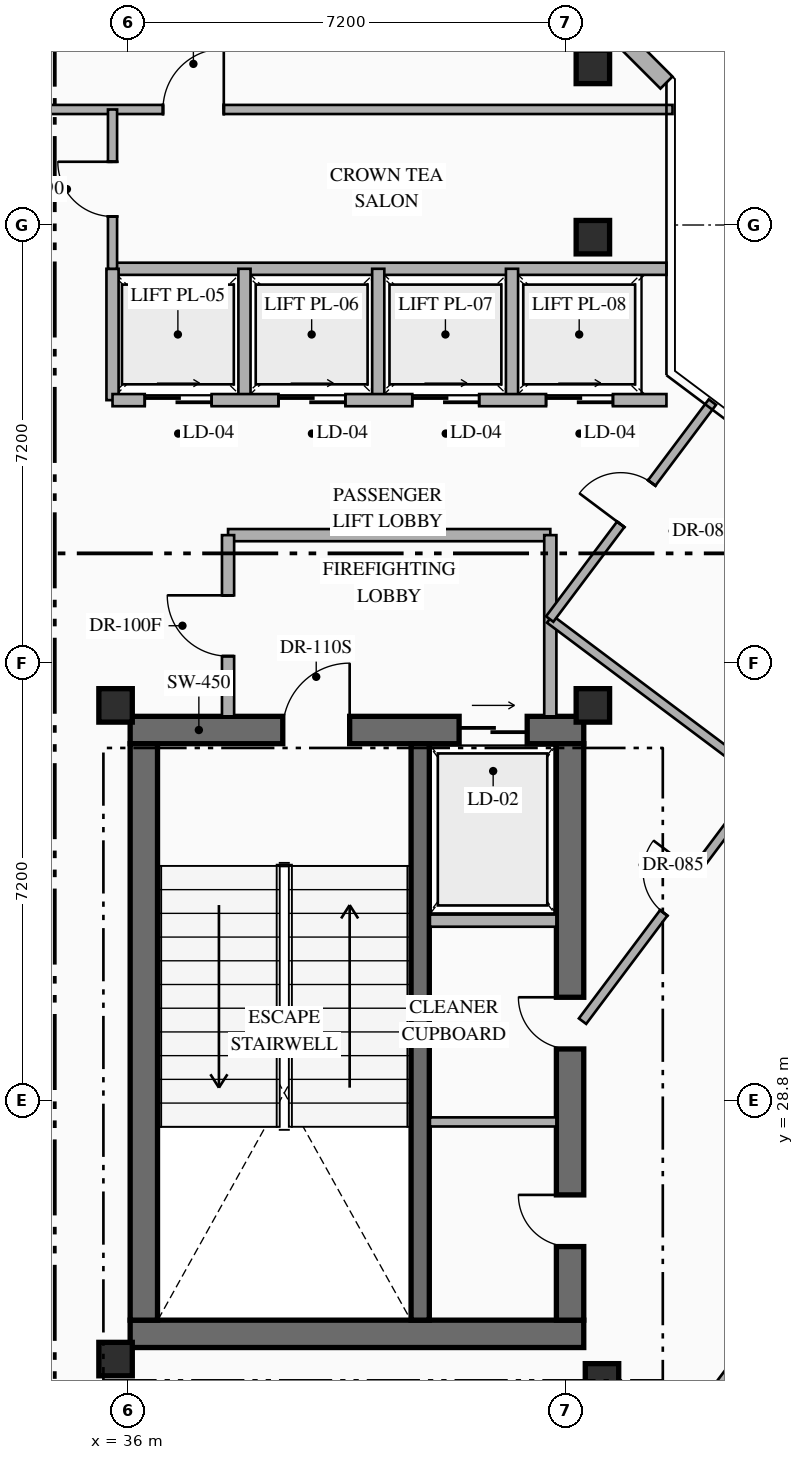
"""IFC4 building model, lengths in metres.
Left out: names, types, materials, properties, quantities, classifications, styles, units other than length and angle.
Written with IfcOpenShell. Run it as: python <this file> out.ifc"""

import sys

from ifc_helpers import new_model, si_unit, direction, frame, frame_2d, origin, origin_2d, place, context, subcontext, project, spatial, rectangle, hollow_rectangle, extrude, element, fill, save


model = new_model("IFC4")
c1 = context("Model", 3, precision=1e-05, world=origin(), true_north=direction((0.0, 1.0)))
c2 = subcontext(c1, "Body", "Model", "MODEL_VIEW")
j1 = project(units=[si_unit("LENGTHUNIT", "METRE"), si_unit("PLANEANGLEUNIT", "RADIAN")], contexts=[c1])
p1 = place(None, origin())
s1 = spatial("IfcSite", under=j1, at=p1, CompositionType="ELEMENT")
p2 = place(p1, origin())
s2 = spatial("IfcBuilding", under=s1, at=p2, CompositionType="ELEMENT")
p3 = place(p2, frame((0.0, 0.0, 281.95)))
s3 = spatial("IfcBuildingStorey", under=s2, at=p3, CompositionType="ELEMENT", Elevation=281.95)
p4 = place(p3, frame((36.04, 24.965, 0.0), z_axis=(0.0, 0.0, 1.0), x_axis=(1.0, 0.0, 0.0)))
e1 = element("IfcWall", 1, at=p4, inside=s3, PredefinedType="SHEAR", context=c2, shape_type="SweptSolid", body=[
    extrude(rectangle(XDim=7.46, YDim=0.45, at=frame_2d((3.73, 0.0))), origin(), (0.0, 0.0, 1.0), 4.0),
])
p5 = place(p3, frame((36.04, 34.895, 0.0), z_axis=(0.0, 0.0, 1.0), x_axis=(1.0, 0.0, 0.0)))
e2 = element("IfcWall", 2, at=p5, inside=s3, PredefinedType="SHEAR", context=c2, shape_type="SweptSolid", body=[
    extrude(rectangle(XDim=7.46, YDim=0.45, at=frame_2d((3.73, 0.0))), origin(), (0.0, 0.0, 1.0), 4.0),
])
p6 = place(p5, frame((2.51, 0.0, 0.0)))
e3 = element("IfcOpeningElement", 3, at=p6, cuts=e2, PredefinedType="OPENING", context=c2, shape_type="SweptSolid", body=[
    extrude(rectangle(XDim=1.1, YDim=2.2, at=frame_2d((0.55, 1.1))), frame((0.0, 0.235, 0.0), z_axis=(0.0, -1.0, 0.0), x_axis=(1.0, 0.0, 0.0)), (0.0, 0.0, 1.0), 0.47),
])
p7 = place(p5, frame((5.41, 0.0, 0.0)))
e4 = element("IfcOpeningElement", 4, at=p7, cuts=e2, PredefinedType="OPENING", context=c2, shape_type="SweptSolid", body=[
    extrude(rectangle(XDim=1.12, YDim=2.15, at=frame_2d((0.56, 1.075))), frame((0.0, 0.235, 0.0), z_axis=(0.0, -1.0, 0.0), x_axis=(1.0, 0.0, 0.0)), (0.0, 0.0, 1.0), 0.47),
])
p8 = place(p3, frame((36.265, 25.19, 0.0), z_axis=(0.0, 0.0, 1.0), x_axis=(0.0, 1.0, 0.0)))
e5 = element("IfcWall", 5, at=p8, inside=s3, PredefinedType="SHEAR", context=c2, shape_type="SweptSolid", body=[
    extrude(rectangle(XDim=9.48, YDim=0.45, at=frame_2d((4.74, 0.0))), origin(), (0.0, 0.0, 1.0), 4.0),
])
p9 = place(p3, frame((43.275, 25.19, 0.0), z_axis=(0.0, 0.0, 1.0), x_axis=(0.0, 1.0, 0.0)))
e6 = element("IfcWall", 6, at=p9, inside=s3, PredefinedType="SHEAR", context=c2, shape_type="SweptSolid", body=[
    extrude(rectangle(XDim=9.48, YDim=0.45, at=frame_2d((4.74, 0.0))), origin(), (0.0, 0.0, 1.0), 4.0),
])
p10 = place(p9, frame((1.21, 0.0, 0.0)))
e7 = element("IfcOpeningElement", 7, at=p10, cuts=e6, PredefinedType="OPENING", context=c2, shape_type="SweptSolid", body=[
    extrude(rectangle(XDim=0.85, YDim=2.08, at=frame_2d((0.425, 1.04))), frame((0.0, 0.235, 0.0), z_axis=(0.0, -1.0, 0.0), x_axis=(1.0, 0.0, 0.0)), (0.0, 0.0, 1.0), 0.47),
])
p11 = place(p9, frame((4.46, 0.0, 0.0)))
e8 = element("IfcOpeningElement", 8, at=p11, cuts=e6, PredefinedType="OPENING", context=c2, shape_type="SweptSolid", body=[
    extrude(rectangle(XDim=0.85, YDim=2.08, at=frame_2d((0.425, 1.04))), frame((0.0, 0.235, 0.0), z_axis=(0.0, -1.0, 0.0), x_axis=(1.0, 0.0, 0.0)), (0.0, 0.0, 1.0), 0.47),
])
p12 = place(p3, frame((40.81, 25.19, 0.0), z_axis=(0.0, 0.0, 1.0), x_axis=(0.0, 1.0, 0.0)))
e9 = element("IfcWall", 9, at=p12, inside=s3, PredefinedType="SHEAR", context=c2, shape_type="SweptSolid", body=[
    extrude(rectangle(XDim=9.48, YDim=0.3, at=frame_2d((4.74, 0.0))), origin(), (0.0, 0.0, 1.0), 4.0),
])
for number, where, z_axis, x_axis in (
    (10, (35.8, 24.55, 0.0), (0.0, 0.0, 1.0), (1.0, 0.0, 0.0)),
    (11, (43.8, 24.2, 0.0), (0.0, 0.0, 1.0), (1.0, 0.0, 0.0)),
    (12, (35.8, 35.3, 0.0), (0.0, 0.0, 1.0), (1.0, 0.0, 0.0)),
    (13, (43.65, 35.3, 0.0), (0.0, 0.0, 1.0), (1.0, 0.0, 0.0)),
    (14, (43.65, 43.0, 0.0), (0.0, 0.0, 1.0), (1.0, 0.0, 0.0)),
    (15, (43.65, 45.8, 0.0), (0.0, 0.0, 1.0), (1.0, 0.0, 0.0)),
):
    element("IfcColumn", number, at=place(p3, frame(where, z_axis=z_axis, x_axis=x_axis)), inside=s3, PredefinedType="COLUMN", context=c2, shape_type="SweptSolid", body=[
        extrude(hollow_rectangle(XDim=0.55, YDim=0.55, WallThickness=0.022, at=origin_2d()), origin(), (0.0, 0.0, 1.0), 4.0),
    ])
p13 = place(p3, frame((52.053, 32.438, 0.0), z_axis=(0.0, 0.0, 1.0), x_axis=(-0.599970072971, -0.800022444397, 0.0)))
e16 = element("IfcWall", 16, at=p13, inside=s3, PredefinedType="STANDARD", context=c2, shape_type="SweptSolid", body=[
    extrude(rectangle(XDim=20.885, YDim=0.28, at=frame_2d((10.442, 0.0))), origin(), (0.0, 0.0, 1.0), 3.75),
])
p14 = place(p13, frame((14.734, 0.0, 0.0)))
e17 = element("IfcOpeningElement", 17, at=p14, cuts=e16, PredefinedType="OPENING", context=c2, shape_type="SweptSolid", body=[
    extrude(rectangle(XDim=1.1, YDim=2.2, at=frame_2d((0.55, 1.1))), frame((0.0, 0.15, 0.0), z_axis=(0.0, -1.0, 0.0), x_axis=(1.0, 0.0, 0.0)), (0.0, 0.0, 1.0), 0.3),
])
p15 = place(p13, frame((6.842, 0.0, 0.0)))
e18 = element("IfcOpeningElement", 18, at=p15, cuts=e16, PredefinedType="OPENING", context=c2, shape_type="SweptSolid", body=[
    extrude(rectangle(XDim=1.1, YDim=2.2, at=frame_2d((0.55, 1.1))), frame((0.0, 0.15, 0.0), z_axis=(0.0, -1.0, 0.0), x_axis=(1.0, 0.0, 0.0)), (0.0, 0.0, 1.0), 0.3),
])
p16 = place(p13, frame((3.962, 0.0, 0.75)))
e19 = element("IfcOpeningElement", 19, at=p16, cuts=e16, PredefinedType="OPENING", context=c2, shape_type="SweptSolid", body=[
    extrude(rectangle(XDim=2.2, YDim=2.2, at=frame_2d((1.1, 1.1))), frame((0.0, 0.15, 0.0), z_axis=(0.0, -1.0, 0.0), x_axis=(1.0, 0.0, 0.0)), (0.0, 0.0, 1.0), 0.3),
])
p17 = place(p3, frame((42.542, 47.86, 0.0), z_axis=(0.0, 0.0, 1.0), x_axis=(0.707106781187, -0.707106781187, 0.0)))
e20 = element("IfcWall", 20, at=p17, inside=s3, PredefinedType="STANDARD", context=c2, shape_type="SweptSolid", body=[
    extrude(rectangle(XDim=3.278, YDim=0.28, at=frame_2d((1.639, 0.0))), origin(), (0.0, 0.0, 1.0), 3.75),
])
p18 = place(p3, frame((40.97, 31.76, 0.0), z_axis=(0.0, 0.0, 1.0), x_axis=(1.0, 0.0, 0.0)))
e21 = element("IfcWall", 21, at=p18, inside=s3, PredefinedType="STANDARD", context=c2, shape_type="SweptSolid", body=[
    extrude(rectangle(XDim=2.08, YDim=0.2, at=frame_2d((1.04, 0.0))), origin(), (0.0, 0.0, 1.0), 3.75),
])
p19 = place(p3, frame((40.97, 28.45, 0.0), z_axis=(0.0, 0.0, 1.0), x_axis=(1.0, 0.0, 0.0)))
e22 = element("IfcWall", 22, at=p19, inside=s3, PredefinedType="PARTITIONING", context=c2, shape_type="SweptSolid", body=[
    extrude(rectangle(XDim=2.08, YDim=0.15, at=frame_2d((1.04, 0.0))), origin(), (0.0, 0.0, 1.0), 3.75),
])
p20 = place(p3, frame((37.65, 38.1, 0.0), z_axis=(0.0, 0.0, 1.0), x_axis=(1.0, 0.0, 0.0)))
e23 = element("IfcWall", 23, at=p20, inside=s3, PredefinedType="STANDARD", context=c2, shape_type="SweptSolid", body=[
    extrude(rectangle(XDim=5.3, YDim=0.2, at=frame_2d((2.65, 0.0))), origin(), (0.0, 0.0, 1.0), 3.75),
])
p21 = place(p3, frame((42.95, 35.12, 0.0), z_axis=(0.0, 0.0, 1.0), x_axis=(0.0, 1.0, 0.0)))
e24 = element("IfcWall", 24, at=p21, inside=s3, PredefinedType="STANDARD", context=c2, shape_type="SweptSolid", body=[
    extrude(rectangle(XDim=2.98, YDim=0.2, at=frame_2d((1.49, 0.0))), origin(), (0.0, 0.0, 1.0), 3.75),
])
p22 = place(p3, frame((37.65, 35.12, 0.0), z_axis=(0.0, 0.0, 1.0), x_axis=(0.0, 1.0, 0.0)))
e25 = element("IfcWall", 25, at=p22, inside=s3, PredefinedType="STANDARD", context=c2, shape_type="SweptSolid", body=[
    extrude(rectangle(XDim=2.98, YDim=0.2, at=frame_2d((1.49, 0.0))), origin(), (0.0, 0.0, 1.0), 3.75),
])
p23 = place(p22, frame((0.99, 0.0, 0.0)))
e26 = element("IfcOpeningElement", 26, at=p23, cuts=e25, PredefinedType="OPENING", context=c2, shape_type="SweptSolid", body=[
    extrude(rectangle(XDim=1.0, YDim=2.2, at=frame_2d((0.5, 1.1))), frame((0.0, 0.11, 0.0), z_axis=(0.0, -1.0, 0.0), x_axis=(1.0, 0.0, 0.0)), (0.0, 0.0, 1.0), 0.22),
])
p24 = place(p3, frame((35.75, 42.48, 0.0), z_axis=(0.0, 0.0, 1.0), x_axis=(1.0, 0.0, 0.0)))
e27 = element("IfcWall", 27, at=p24, inside=s3, PredefinedType="STANDARD", context=c2, shape_type="SweptSolid", body=[
    extrude(rectangle(XDim=9.11, YDim=0.2, at=frame_2d((4.555, 0.0))), origin(), (0.0, 0.0, 1.0), 3.75),
])
for number, where, z_axis, x_axis in (
    (28, (35.75, 40.32, 0.0), (0.0, 0.0, 1.0), (0.0, 1.0, 0.0)),
    (29, (37.92, 40.32, 0.0), (0.0, 0.0, 1.0), (0.0, 1.0, 0.0)),
    (30, (40.12, 40.32, 0.0), (0.0, 0.0, 1.0), (0.0, 1.0, 0.0)),
    (31, (42.32, 40.32, 0.0), (0.0, 0.0, 1.0), (0.0, 1.0, 0.0)),
):
    element("IfcWall", number, at=place(p3, frame(where, z_axis=z_axis, x_axis=x_axis)), inside=s3, PredefinedType="STANDARD", context=c2, shape_type="SweptSolid", body=[
        extrude(rectangle(XDim=2.16, YDim=0.2, at=frame_2d((1.08, 0.0))), origin(), (0.0, 0.0, 1.0), 3.75),
    ])
p25 = place(p3, frame((35.75, 40.32, 0.0), z_axis=(0.0, 0.0, 1.0), x_axis=(1.0, 0.0, 0.0)))
e32 = element("IfcWall", 32, at=p25, inside=s3, PredefinedType="STANDARD", context=c2, shape_type="SweptSolid", body=[
    extrude(rectangle(XDim=9.11, YDim=0.2, at=frame_2d((4.555, 0.0))), origin(), (0.0, 0.0, 1.0), 3.75),
])
p26 = place(p25, frame((0.53, 0.0, 0.0)))
e33 = element("IfcOpeningElement", 33, at=p26, cuts=e32, PredefinedType="OPENING", context=c2, shape_type="SweptSolid", body=[
    extrude(rectangle(XDim=1.1, YDim=2.18, at=frame_2d((0.55, 1.09))), frame((0.0, 0.11, 0.0), z_axis=(0.0, -1.0, 0.0), x_axis=(1.0, 0.0, 0.0)), (0.0, 0.0, 1.0), 0.22),
])
p27 = place(p25, frame((2.73, 0.0, 0.0)))
e34 = element("IfcOpeningElement", 34, at=p27, cuts=e32, PredefinedType="OPENING", context=c2, shape_type="SweptSolid", body=[
    extrude(rectangle(XDim=1.1, YDim=2.18, at=frame_2d((0.55, 1.09))), frame((0.0, 0.11, 0.0), z_axis=(0.0, -1.0, 0.0), x_axis=(1.0, 0.0, 0.0)), (0.0, 0.0, 1.0), 0.22),
])
p28 = place(p25, frame((4.93, 0.0, 0.0)))
e35 = element("IfcOpeningElement", 35, at=p28, cuts=e32, PredefinedType="OPENING", context=c2, shape_type="SweptSolid", body=[
    extrude(rectangle(XDim=1.1, YDim=2.18, at=frame_2d((0.55, 1.09))), frame((0.0, 0.11, 0.0), z_axis=(0.0, -1.0, 0.0), x_axis=(1.0, 0.0, 0.0)), (0.0, 0.0, 1.0), 0.22),
])
p29 = place(p25, frame((7.13, 0.0, 0.0)))
e36 = element("IfcOpeningElement", 36, at=p29, cuts=e32, PredefinedType="OPENING", context=c2, shape_type="SweptSolid", body=[
    extrude(rectangle(XDim=1.1, YDim=2.18, at=frame_2d((0.55, 1.09))), frame((0.0, 0.11, 0.0), z_axis=(0.0, -1.0, 0.0), x_axis=(1.0, 0.0, 0.0)), (0.0, 0.0, 1.0), 0.22),
])
p30 = place(p3, frame((23.2, 45.1, 0.0), z_axis=(0.0, 0.0, 1.0), x_axis=(1.0, 0.0, 0.0)))
e37 = element("IfcWall", 37, at=p30, inside=s3, PredefinedType="PARTITIONING", context=c2, shape_type="SweptSolid", body=[
    extrude(rectangle(XDim=21.76, YDim=0.15, at=frame_2d((10.88, 0.0))), origin(), (0.0, 0.0, 1.0), 3.75),
])
p31 = place(p30, frame((13.38, 0.0, 0.0)))
e38 = element("IfcOpeningElement", 38, at=p31, cuts=e37, PredefinedType="OPENING", context=c2, shape_type="SweptSolid", body=[
    extrude(rectangle(XDim=1.0, YDim=2.15, at=frame_2d((0.5, 1.075))), frame((0.0, 0.085, 0.0), z_axis=(0.0, -1.0, 0.0), x_axis=(1.0, 0.0, 0.0)), (0.0, 0.0, 1.0), 0.17),
])
p32 = place(p3, frame((35.75, 42.48, 0.0), z_axis=(0.0, 0.0, 1.0), x_axis=(0.0, 1.0, 0.0)))
e39 = element("IfcWall", 39, at=p32, inside=s3, PredefinedType="PARTITIONING", context=c2, shape_type="SweptSolid", body=[
    extrude(rectangle(XDim=2.62, YDim=0.15, at=frame_2d((1.31, 0.0))), origin(), (0.0, 0.0, 1.0), 3.75),
])
p33 = place(p32, frame((0.86, 0.0, 0.0)))
e40 = element("IfcOpeningElement", 40, at=p33, cuts=e39, PredefinedType="OPENING", context=c2, shape_type="SweptSolid", body=[
    extrude(rectangle(XDim=0.9, YDim=2.15, at=frame_2d((0.45, 1.075))), frame((0.0, 0.085, 0.0), z_axis=(0.0, -1.0, 0.0), x_axis=(1.0, 0.0, 0.0)), (0.0, 0.0, 1.0), 0.17),
])
p34 = place(p3, frame((28.18, 27.04, 0.0), z_axis=(0.0, 0.0, 1.0), x_axis=(0.80000367127, -0.599995104942, 0.0)))
e41 = element("IfcWall", 41, at=p34, inside=s3, PredefinedType="PARTITIONING", context=c2, shape_type="SweptSolid", body=[
    extrude(rectangle(XDim=15.96, YDim=0.15, at=frame_2d((7.98, 0.0))), origin(), (0.0, 0.0, 1.0), 3.75),
])
p35 = place(p34, frame((10.39, 0.0, 0.0)))
e42 = element("IfcOpeningElement", 42, at=p35, cuts=e41, PredefinedType="OPENING", context=c2, shape_type="SweptSolid", body=[
    extrude(rectangle(XDim=0.9, YDim=2.15, at=frame_2d((0.45, 1.075))), frame((0.0, 0.085, 0.0), z_axis=(0.0, -1.0, 0.0), x_axis=(1.0, 0.0, 0.0)), (0.0, 0.0, 1.0), 0.17),
])
p36 = place(p3, frame((43.48, 30.107, 0.0), z_axis=(0.0, 0.0, 1.0), x_axis=(0.600015730265, 0.799988202059, 0.0)))
e43 = element("IfcWall", 43, at=p36, inside=s3, PredefinedType="PARTITIONING", context=c2, shape_type="SweptSolid", body=[
    extrude(rectangle(XDim=4.967, YDim=0.15, at=frame_2d((2.483, 0.0))), origin(), (0.0, 0.0, 1.0), 3.75),
])
p37 = place(p36, frame((2.226, 0.0, 0.0)))
e44 = element("IfcOpeningElement", 44, at=p37, cuts=e43, PredefinedType="OPENING", context=c2, shape_type="SweptSolid", body=[
    extrude(rectangle(XDim=0.85, YDim=2.08, at=frame_2d((0.425, 1.04))), frame((0.0, 0.085, 0.0), z_axis=(0.0, -1.0, 0.0), x_axis=(1.0, 0.0, 0.0)), (0.0, 0.0, 1.0), 0.17),
])
p38 = place(p3, frame((42.94, 36.72, 0.0), z_axis=(0.0, 0.0, 1.0), x_axis=(0.800013316712, -0.599982243973, 0.0)))
e45 = element("IfcWall", 45, at=p38, inside=s3, PredefinedType="PARTITIONING", context=c2, shape_type="SweptSolid", body=[
    extrude(rectangle(XDim=4.4, YDim=0.15, at=frame_2d((2.2, 0.0))), origin(), (0.0, 0.0, 1.0), 3.295),
])
p39 = place(p3, frame((42.94, 36.72, 0.0), z_axis=(0.0, 0.0, 1.0), x_axis=(0.599991241767, 0.8000065686, 0.0)))
e46 = element("IfcWall", 46, at=p39, inside=s3, PredefinedType="PARTITIONING", context=c2, shape_type="SweptSolid", body=[
    extrude(rectangle(XDim=4.46, YDim=0.15, at=frame_2d((2.23, 0.0))), origin(), (0.0, 0.0, 1.0), 3.75),
])
p40 = place(p39, frame((1.947, 0.0, 0.0)))
e47 = element("IfcOpeningElement", 47, at=p40, cuts=e46, PredefinedType="OPENING", context=c2, shape_type="SweptSolid", body=[
    extrude(rectangle(XDim=0.85, YDim=2.08, at=frame_2d((0.425, 1.04))), frame((0.0, 0.085, 0.0), z_axis=(0.0, -1.0, 0.0), x_axis=(1.0, 0.0, 0.0)), (0.0, 0.0, 1.0), 0.17),
])
p41 = place(p6, origin())
e48 = element("IfcDoor", 48, at=p41, inside=s3, OperationType="SINGLE_SWING_RIGHT", PredefinedType="DOOR", context=c2, shape_type="SweptSolid", body=[
    extrude(rectangle(XDim=1.1, YDim=2.2, at=frame_2d((0.55, 1.1))), frame((0.0, 0.025, 0.0), z_axis=(0.0, -1.0, 0.0), x_axis=(1.0, 0.0, 0.0)), (0.0, 0.0, 1.0), 0.05),
])
fill(e3, e48)
p42 = place(p7, origin())
e49 = element("IfcDoor", 49, at=p42, inside=s3, OperationType="SLIDING_TO_RIGHT", PredefinedType="USERDEFINED", context=c2, shape_type="SweptSolid", body=[
    extrude(rectangle(XDim=1.12, YDim=2.15, at=frame_2d((0.56, 1.075))), frame((0.0, 0.025, 0.0), z_axis=(0.0, -1.0, 0.0), x_axis=(1.0, 0.0, 0.0)), (0.0, 0.0, 1.0), 0.05),
])
fill(e4, e49)
p43 = place(p10, origin())
e50 = element("IfcDoor", 50, at=p43, inside=s3, OperationType="SINGLE_SWING_RIGHT", PredefinedType="DOOR", context=c2, shape_type="SweptSolid", body=[
    extrude(rectangle(XDim=0.85, YDim=2.08, at=frame_2d((0.425, 1.04))), frame((0.0, 0.025, 0.0), z_axis=(0.0, -1.0, 0.0), x_axis=(1.0, 0.0, 0.0)), (0.0, 0.0, 1.0), 0.05),
])
fill(e7, e50)
p44 = place(p11, origin())
e51 = element("IfcDoor", 51, at=p44, inside=s3, OperationType="SINGLE_SWING_RIGHT", PredefinedType="DOOR", context=c2, shape_type="SweptSolid", body=[
    extrude(rectangle(XDim=0.85, YDim=2.08, at=frame_2d((0.425, 1.04))), frame((0.0, 0.025, 0.0), z_axis=(0.0, -1.0, 0.0), x_axis=(1.0, 0.0, 0.0)), (0.0, 0.0, 1.0), 0.05),
])
fill(e8, e51)
p45 = place(p23, origin())
e52 = element("IfcDoor", 52, at=p45, inside=s3, OperationType="SINGLE_SWING_RIGHT", PredefinedType="DOOR", context=c2, shape_type="SweptSolid", body=[
    extrude(rectangle(XDim=1.0, YDim=2.2, at=frame_2d((0.5, 1.1))), frame((0.0, 0.025, 0.0), z_axis=(0.0, -1.0, 0.0), x_axis=(1.0, 0.0, 0.0)), (0.0, 0.0, 1.0), 0.05),
])
fill(e26, e52)
p46 = place(p26, origin())
e53 = element("IfcDoor", 53, at=p46, inside=s3, OperationType="SLIDING_TO_RIGHT", PredefinedType="USERDEFINED", context=c2, shape_type="SweptSolid", body=[
    extrude(rectangle(XDim=1.1, YDim=2.18, at=frame_2d((0.55, 1.09))), frame((0.0, 0.025, 0.0), z_axis=(0.0, -1.0, 0.0), x_axis=(1.0, 0.0, 0.0)), (0.0, 0.0, 1.0), 0.05),
])
fill(e33, e53)
p47 = place(p27, origin())
e54 = element("IfcDoor", 54, at=p47, inside=s3, OperationType="SLIDING_TO_RIGHT", PredefinedType="USERDEFINED", context=c2, shape_type="SweptSolid", body=[
    extrude(rectangle(XDim=1.1, YDim=2.18, at=frame_2d((0.55, 1.09))), frame((0.0, 0.025, 0.0), z_axis=(0.0, -1.0, 0.0), x_axis=(1.0, 0.0, 0.0)), (0.0, 0.0, 1.0), 0.05),
])
fill(e34, e54)
p48 = place(p28, origin())
e55 = element("IfcDoor", 55, at=p48, inside=s3, OperationType="SLIDING_TO_RIGHT", PredefinedType="USERDEFINED", context=c2, shape_type="SweptSolid", body=[
    extrude(rectangle(XDim=1.1, YDim=2.18, at=frame_2d((0.55, 1.09))), frame((0.0, 0.025, 0.0), z_axis=(0.0, -1.0, 0.0), x_axis=(1.0, 0.0, 0.0)), (0.0, 0.0, 1.0), 0.05),
])
fill(e35, e55)
p49 = place(p29, origin())
e56 = element("IfcDoor", 56, at=p49, inside=s3, OperationType="SLIDING_TO_RIGHT", PredefinedType="USERDEFINED", context=c2, shape_type="SweptSolid", body=[
    extrude(rectangle(XDim=1.1, YDim=2.18, at=frame_2d((0.55, 1.09))), frame((0.0, 0.025, 0.0), z_axis=(0.0, -1.0, 0.0), x_axis=(1.0, 0.0, 0.0)), (0.0, 0.0, 1.0), 0.05),
])
fill(e36, e56)
p50 = place(p31, origin())
e57 = element("IfcDoor", 57, at=p50, inside=s3, OperationType="SINGLE_SWING_RIGHT", PredefinedType="DOOR", context=c2, shape_type="SweptSolid", body=[
    extrude(rectangle(XDim=1.0, YDim=2.15, at=frame_2d((0.5, 1.075))), frame((0.0, 0.025, 0.0), z_axis=(0.0, -1.0, 0.0), x_axis=(1.0, 0.0, 0.0)), (0.0, 0.0, 1.0), 0.05),
])
fill(e38, e57)
p51 = place(p33, origin())
e58 = element("IfcDoor", 58, at=p51, inside=s3, OperationType="SINGLE_SWING_RIGHT", PredefinedType="DOOR", context=c2, shape_type="SweptSolid", body=[
    extrude(rectangle(XDim=0.9, YDim=2.15, at=frame_2d((0.45, 1.075))), frame((0.0, 0.025, 0.0), z_axis=(0.0, -1.0, 0.0), x_axis=(1.0, 0.0, 0.0)), (0.0, 0.0, 1.0), 0.05),
])
fill(e40, e58)
p52 = place(p37, origin())
e59 = element("IfcDoor", 59, at=p52, inside=s3, OperationType="SINGLE_SWING_RIGHT", PredefinedType="DOOR", context=c2, shape_type="SweptSolid", body=[
    extrude(rectangle(XDim=0.85, YDim=2.08, at=frame_2d((0.425, 1.04))), frame((0.0, 0.025, 0.0), z_axis=(0.0, -1.0, 0.0), x_axis=(1.0, 0.0, 0.0)), (0.0, 0.0, 1.0), 0.05),
])
fill(e44, e59)
p53 = place(p40, origin())
e60 = element("IfcDoor", 60, at=p53, inside=s3, OperationType="SINGLE_SWING_LEFT", PredefinedType="DOOR", context=c2, shape_type="SweptSolid", body=[
    extrude(rectangle(XDim=0.85, YDim=2.08, at=frame_2d((0.425, 1.04))), frame((0.0, 0.025, 0.0), z_axis=(0.0, -1.0, 0.0), x_axis=(1.0, 0.0, 0.0)), (0.0, 0.0, 1.0), 0.05),
])
fill(e47, e60)
save(model, sys.argv[1])
